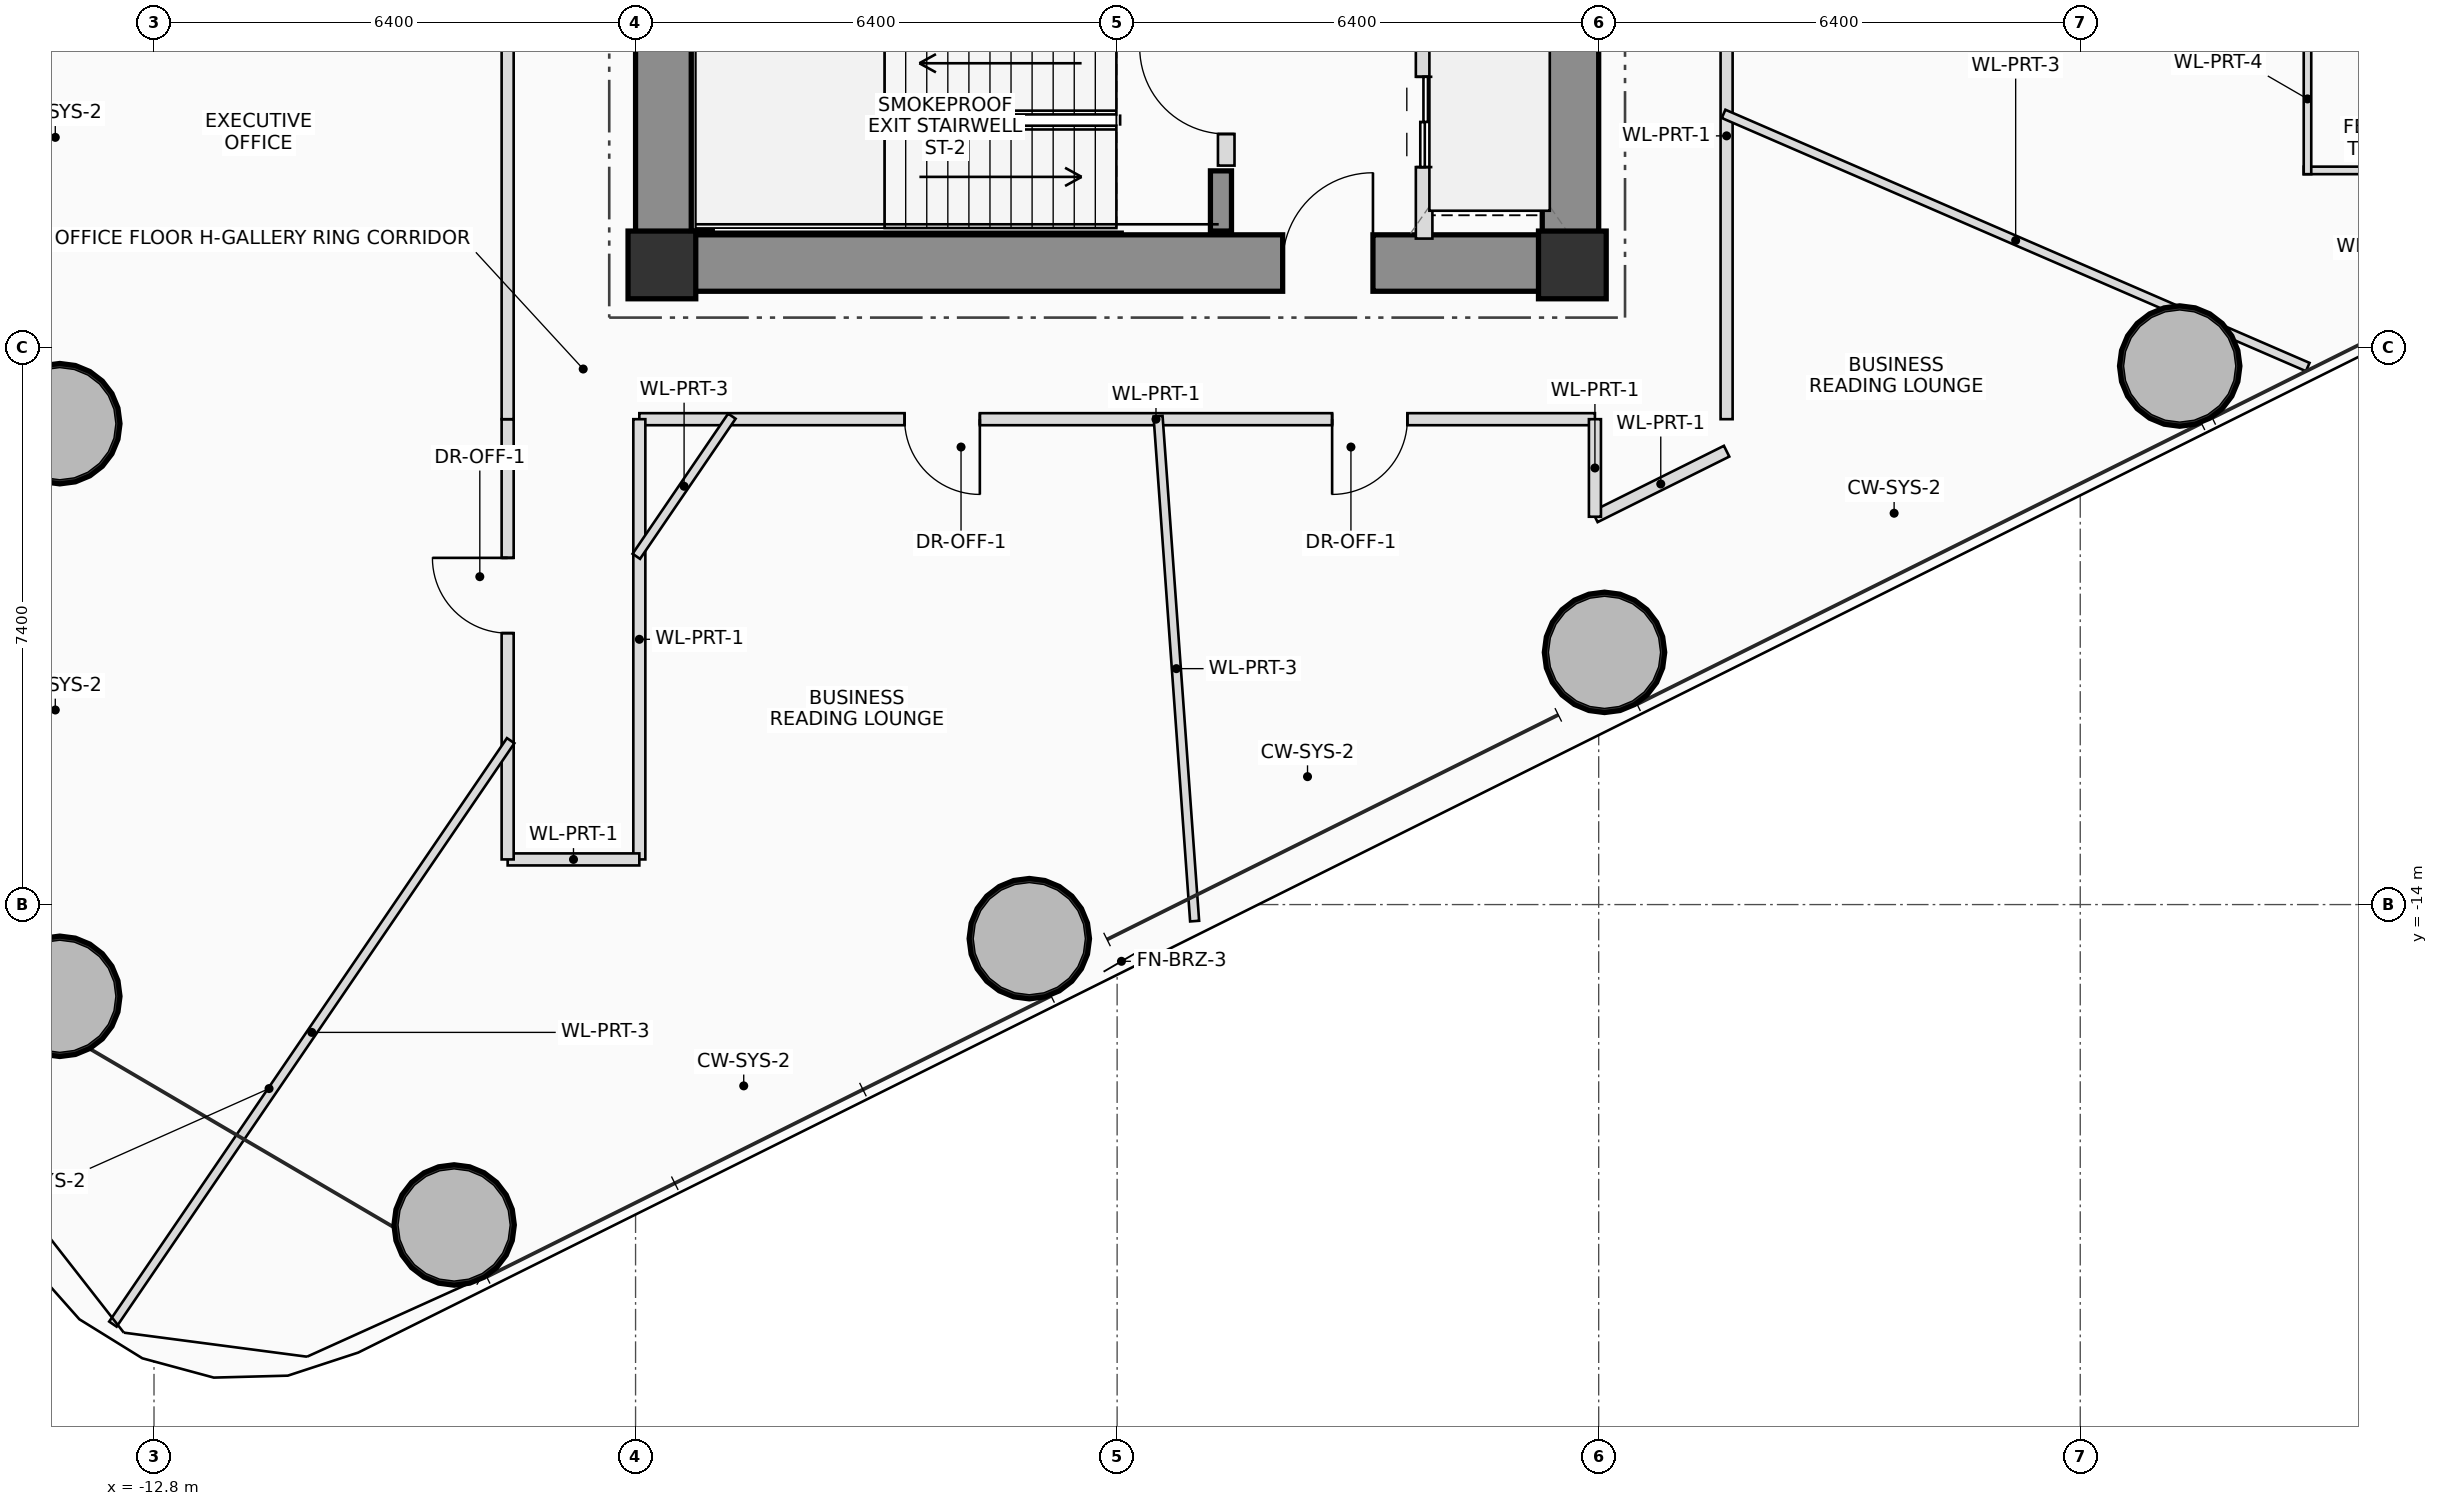
"""IFC4 building model, lengths in metres.
Left out: names, types, materials, properties, quantities, classifications, styles, units other than length and angle.
Written with IfcOpenShell. Run it as: python <this file> out.ifc"""

import sys

from ifc_helpers import new_model, si_unit, direction, frame, frame_2d, origin, origin_2d, place, context, subcontext, project, spatial, rectangle, hollow_circle, extrude, source, transform, mapped, element, fill, save


model = new_model("IFC4")
c1 = context("Model", 3, precision=1e-05, world=origin(), true_north=direction((0.0, 1.0)))
c2 = subcontext(c1, "Body", "Model", "MODEL_VIEW")
j1 = project(units=[si_unit("LENGTHUNIT", "METRE"), si_unit("PLANEANGLEUNIT", "RADIAN")], contexts=[c1])
p1 = place(None, origin())
s1 = spatial("IfcSite", under=j1, at=p1, CompositionType="ELEMENT")
p2 = place(p1, origin())
s2 = spatial("IfcBuilding", under=s1, at=p2, CompositionType="ELEMENT")
p3 = place(p2, frame((0.0, 0.0, 31.2)))
s3 = spatial("IfcBuildingStorey", under=s2, at=p3, CompositionType="ELEMENT", Elevation=31.2)
m1 = source(origin(), c2, "Body", "SweptSolid", [
    extrude(rectangle(XDim=0.9, YDim=0.9, at=origin_2d()), origin(), (0.0, 0.0, 1.0), 3.7),
])
for number, where, z_axis, x_axis in (
    (1, (-6.05, -5.5, 0.0), (0.0, 0.0, 1.0), (1.0, 0.0, 0.0)),
    (2, (6.05, -5.5, 0.0), (0.0, 0.0, 1.0), (1.0, 0.0, 0.0)),
):
    element("IfcColumn", number, at=place(p3, frame(where, z_axis=z_axis, x_axis=x_axis)), inside=s3, PredefinedType="COLUMN", context=c2, shape_type="MappedRepresentation", body=[
        mapped(m1, transform((0.0, 0.0, 0.0), scale=1.0)),
    ])
p4 = place(p3, frame((-6.4, -5.475, 0.0), z_axis=(0.0, 0.0, 1.0), x_axis=(1.0, 0.0, 0.0)))
e3 = element("IfcWall", 3, at=p4, inside=s3, PredefinedType="SHEAR", context=c2, shape_type="SweptSolid", body=[
    extrude(rectangle(XDim=12.8, YDim=0.75, at=frame_2d((6.4, 0.0))), origin(), (0.0, 0.0, 1.0), 3.7),
])
p5 = place(p4, frame((8.6, 0.0, 0.0)))
e4 = element("IfcOpeningElement", 4, at=p5, cuts=e3, PredefinedType="OPENING", context=c2, shape_type="SweptSolid", body=[
    extrude(rectangle(XDim=1.2, YDim=2.2, at=frame_2d((0.6, 1.1))), frame((0.0, 0.385, 0.0), z_axis=(0.0, -1.0, 0.0), x_axis=(1.0, 0.0, 0.0)), (0.0, 0.0, 1.0), 0.77),
])
p6 = place(p3, frame((6.025, -5.1, 0.0), z_axis=(0.0, 0.0, 1.0), x_axis=(0.0, 1.0, 0.0)))
e5 = element("IfcWall", 5, at=p6, inside=s3, PredefinedType="SHEAR", context=c2, shape_type="SweptSolid", body=[
    extrude(rectangle(XDim=10.2, YDim=0.75, at=frame_2d((5.1, 0.0))), origin(), (0.0, 0.0, 1.0), 3.7),
])
p7 = place(p3, frame((-6.025, -5.1, 0.0), z_axis=(0.0, 0.0, 1.0), x_axis=(0.0, 1.0, 0.0)))
e6 = element("IfcWall", 6, at=p7, inside=s3, PredefinedType="SHEAR", context=c2, shape_type="SweptSolid", body=[
    extrude(rectangle(XDim=3.35, YDim=0.75, at=frame_2d((1.675, 0.0))), origin(), (0.0, 0.0, 1.0), 3.7),
])
p8 = place(p3, frame((-5.52, -5.05, 0.0), z_axis=(0.0, 0.0, 1.0), x_axis=(0.0, 1.0, 0.0)))
e7 = element("IfcWall", 7, at=p8, inside=s3, PredefinedType="SHEAR", context=c2, shape_type="SweptSolid", body=[
    extrude(rectangle(XDim=2.75, YDim=0.28, at=frame_2d((1.375, 0.0))), origin(), (0.0, 0.0, 1.0), 3.7),
])
p9 = place(p3, frame((1.38, -5.05, 0.0), z_axis=(0.0, 0.0, 1.0), x_axis=(0.0, 1.0, 0.0)))
e8 = element("IfcWall", 8, at=p9, inside=s3, PredefinedType="SHEAR", context=c2, shape_type="SweptSolid", body=[
    extrude(rectangle(XDim=0.8, YDim=0.28, at=frame_2d((0.4, 0.0))), origin(), (0.0, 0.0, 1.0), 3.7),
])
m2 = source(origin(), c2, "Body", "SweptSolid", [
    extrude(hollow_circle(Radius=0.8, WallThickness=0.055, at=origin_2d()), origin(), (0.0, 0.0, 1.0), 3.7),
])
for number, where, z_axis, x_axis in (
    (9, (-8.812, -18.258, 0.0), (0.0, 0.0, 1.0), (1.0, 0.0, 0.0)),
    (10, (-1.167, -14.453, 0.0), (0.0, 0.0, 1.0), (1.0, 0.0, 0.0)),
    (11, (6.477, -10.648, 0.0), (0.0, 0.0, 1.0), (1.0, 0.0, 0.0)),
    (12, (14.122, -6.844, 0.0), (0.0, 0.0, 1.0), (1.0, 0.0, 0.0)),
    (13, (-14.052, -7.61, 0.0), (0.0, 0.0, 1.0), (1.0, 0.0, 0.0)),
    (14, (-14.052, -15.219, 0.0), (0.0, 0.0, 1.0), (1.0, 0.0, 0.0)),
):
    element("IfcColumn", number, at=place(p3, frame(where, z_axis=z_axis, x_axis=x_axis)), inside=s3, PredefinedType="COLUMN", context=c2, shape_type="MappedRepresentation", body=[
        mapped(m2, transform((0.0, 0.0, 0.0), scale=1.0)),
    ])
p10 = place(p3, frame((1.45, -4.18, 0.0), z_axis=(0.0, 0.0, 1.0), x_axis=(0.0, 1.0, 0.0)))
e15 = element("IfcWall", 15, at=p10, inside=s3, PredefinedType="PLUMBINGWALL", context=c2, shape_type="SweptSolid", body=[
    extrude(rectangle(XDim=1.98, YDim=0.22, at=frame_2d((0.99, 0.0))), origin(), (0.0, 0.0, 1.0), 3.495),
])
p11 = place(p10, frame((0.42, 0.0, 0.0)))
e16 = element("IfcOpeningElement", 16, at=p11, cuts=e15, PredefinedType="OPENING", context=c2, shape_type="SweptSolid", body=[
    extrude(rectangle(XDim=1.15, YDim=2.15, at=frame_2d((0.575, 1.075))), frame((0.0, 0.12, 0.0), z_axis=(0.0, -1.0, 0.0), x_axis=(1.0, 0.0, 0.0)), (0.0, 0.0, 1.0), 0.24),
])
p12 = place(p3, frame((4.08, -5.15, 0.0), z_axis=(0.0, 0.0, 1.0), x_axis=(0.0, 1.0, 0.0)))
e17 = element("IfcWall", 17, at=p12, inside=s3, PredefinedType="PLUMBINGWALL", context=c2, shape_type="SweptSolid", body=[
    extrude(rectangle(XDim=2.95, YDim=0.22, at=frame_2d((1.475, 0.0))), origin(), (0.0, 0.0, 1.0), 3.495),
])
p13 = place(p12, frame((0.95, 0.0, 0.0)))
e18 = element("IfcOpeningElement", 18, at=p13, cuts=e17, PredefinedType="OPENING", context=c2, shape_type="SweptSolid", body=[
    extrude(rectangle(XDim=1.2, YDim=2.25, at=frame_2d((0.6, 1.125))), frame((0.0, 0.12, 0.0), z_axis=(0.0, -1.0, 0.0), x_axis=(1.0, 0.0, 0.0)), (0.0, 0.0, 1.0), 0.24),
])
p14 = place(p3, frame((17.82, -4.244, 0.0), z_axis=(0.0, 0.0, 1.0), x_axis=(-1.0, 0.0, 0.0)))
e19 = element("IfcWall", 19, at=p14, inside=s3, PredefinedType="PARTITIONING", context=c2, shape_type="SweptSolid", body=[
    extrude(rectangle(XDim=2.05, YDim=0.1, at=frame_2d((1.025, 0.0))), origin(), (0.0, 0.0, 1.0), 3.495),
])
p15 = place(p3, frame((15.82, -4.294, 0.0), z_axis=(0.0, 0.0, 1.0), x_axis=(0.0, 1.0, 0.0)))
e20 = element("IfcWall", 20, at=p15, inside=s3, PredefinedType="PARTITIONING", context=c2, shape_type="SweptSolid", body=[
    extrude(rectangle(XDim=2.0, YDim=0.1, at=frame_2d((1.0, 0.0))), origin(), (0.0, 0.0, 1.0), 2.8),
])
p16 = place(p3, frame((6.35, -7.55, 0.0), z_axis=(0.0, 0.0, 1.0), x_axis=(-1.0, 0.0, 0.0)))
e21 = element("IfcWall", 21, at=p16, inside=s3, PredefinedType="PARTITIONING", context=c2, shape_type="SweptSolid", body=[
    extrude(rectangle(XDim=12.7, YDim=0.16, at=frame_2d((6.35, 0.0))), origin(), (0.0, 0.0, 1.0), 2.8),
])
p17 = place(p16, frame((2.493, 0.0, 0.0)))
e22 = element("IfcOpeningElement", 22, at=p17, cuts=e21, PredefinedType="OPENING", context=c2, shape_type="SweptSolid", body=[
    extrude(rectangle(XDim=1.0, YDim=2.25, at=frame_2d((0.5, 1.125))), frame((0.0, 0.09, 0.0), z_axis=(0.0, -1.0, 0.0), x_axis=(1.0, 0.0, 0.0)), (0.0, 0.0, 1.0), 0.18),
])
p18 = place(p16, frame((8.175, 0.0, 0.0)))
e23 = element("IfcOpeningElement", 23, at=p18, cuts=e21, PredefinedType="OPENING", context=c2, shape_type="SweptSolid", body=[
    extrude(rectangle(XDim=1.0, YDim=2.25, at=frame_2d((0.5, 1.125))), frame((0.0, 0.09, 0.0), z_axis=(0.0, -1.0, 0.0), x_axis=(1.0, 0.0, 0.0)), (0.0, 0.0, 1.0), 0.18),
])
p19 = place(p3, frame((-6.35, -7.55, 0.0), z_axis=(0.0, 0.0, 1.0), x_axis=(0.0, -1.0, 0.0)))
e24 = element("IfcWall", 24, at=p19, inside=s3, PredefinedType="PARTITIONING", context=c2, shape_type="SweptSolid", body=[
    extrude(rectangle(XDim=5.85, YDim=0.16, at=frame_2d((2.925, 0.0))), origin(), (0.0, 0.0, 1.0), 2.8),
])
p20 = place(p3, frame((-6.35, -13.4, 0.0), z_axis=(0.0, 0.0, 1.0), x_axis=(-1.0, 0.0, 0.0)))
e25 = element("IfcWall", 25, at=p20, inside=s3, PredefinedType="PARTITIONING", context=c2, shape_type="SweptSolid", body=[
    extrude(rectangle(XDim=1.75, YDim=0.16, at=frame_2d((0.875, 0.0))), origin(), (0.0, 0.0, 1.0), 2.8),
])
p21 = place(p3, frame((-8.1, -13.4, 0.0), z_axis=(0.0, 0.0, 1.0), x_axis=(0.0, 1.0, 0.0)))
e26 = element("IfcWall", 26, at=p21, inside=s3, PredefinedType="PARTITIONING", context=c2, shape_type="SweptSolid", body=[
    extrude(rectangle(XDim=5.85, YDim=0.16, at=frame_2d((2.925, 0.0))), origin(), (0.0, 0.0, 1.0), 2.8),
])
p22 = place(p21, frame((3.007, 0.0, 0.0)))
e27 = element("IfcOpeningElement", 27, at=p22, cuts=e26, PredefinedType="OPENING", context=c2, shape_type="SweptSolid", body=[
    extrude(rectangle(XDim=1.0, YDim=2.25, at=frame_2d((0.5, 1.125))), frame((0.0, 0.09, 0.0), z_axis=(0.0, -1.0, 0.0), x_axis=(1.0, 0.0, 0.0)), (0.0, 0.0, 1.0), 0.18),
])
p23 = place(p3, frame((-8.1, -7.55, 0.0), z_axis=(0.0, 0.0, 1.0), x_axis=(0.0, 1.0, 0.0)))
e28 = element("IfcWall", 28, at=p23, inside=s3, PredefinedType="PARTITIONING", context=c2, shape_type="SweptSolid", body=[
    extrude(rectangle(XDim=15.1, YDim=0.16, at=frame_2d((7.55, 0.0))), origin(), (0.0, 0.0, 1.0), 2.8),
])
p24 = place(p23, frame((11.285, 0.0, 0.0)))
e29 = element("IfcOpeningElement", 29, at=p24, cuts=e28, PredefinedType="OPENING", context=c2, shape_type="SweptSolid", body=[
    extrude(rectangle(XDim=1.0, YDim=2.25, at=frame_2d((0.5, 1.125))), frame((0.0, 0.09, 0.0), z_axis=(0.0, -1.0, 0.0), x_axis=(1.0, 0.0, 0.0)), (0.0, 0.0, 1.0), 0.18),
])
p25 = place(p3, frame((8.1, -0.02, 0.0), z_axis=(0.0, 0.0, 1.0), x_axis=(0.0, -1.0, 0.0)))
e30 = element("IfcWall", 30, at=p25, inside=s3, PredefinedType="PARTITIONING", context=c2, shape_type="SweptSolid", body=[
    extrude(rectangle(XDim=7.53, YDim=0.16, at=frame_2d((3.765, 0.0))), origin(), (0.0, 0.0, 1.0), 2.8),
])
p26 = place(p3, frame((8.1, -7.975, 0.0), z_axis=(0.0, 0.0, 1.0), x_axis=(-0.89527489017, -0.445514164793, 0.0)))
e31 = element("IfcWall", 31, at=p26, inside=s3, PredefinedType="PARTITIONING", context=c2, shape_type="SweptSolid", body=[
    extrude(rectangle(XDim=1.955, YDim=0.16, at=frame_2d((0.977, 0.0))), origin(), (0.0, 0.0, 1.0), 2.8),
])
p27 = place(p3, frame((6.35, -8.846, 0.0), z_axis=(0.0, 0.0, 1.0), x_axis=(0.0, 1.0, 0.0)))
e32 = element("IfcWall", 32, at=p27, inside=s3, PredefinedType="PARTITIONING", context=c2, shape_type="SweptSolid", body=[
    extrude(rectangle(XDim=1.296, YDim=0.16, at=frame_2d((0.648, 0.0))), origin(), (0.0, 0.0, 1.0), 2.8),
])
p28 = place(p3, frame((-5.12, -7.51, 0.0), z_axis=(0.0, 0.0, 1.0), x_axis=(-0.563343546536, -0.826222759657, 0.0)))
e33 = element("IfcWall", 33, at=p28, inside=s3, PredefinedType="PARTITIONING", context=c2, shape_type="SweptSolid", body=[
    extrude(rectangle(XDim=2.254, YDim=0.12, at=frame_2d((1.127, 0.0))), origin(), (0.0, 0.0, 1.0), 3.16),
])
p29 = place(p3, frame((-8.06, -11.822, 0.0), z_axis=(0.0, 0.0, 1.0), x_axis=(-0.56331583488, -0.826241653618, 0.0)))
e34 = element("IfcWall", 34, at=p29, inside=s3, PredefinedType="PARTITIONING", context=c2, shape_type="SweptSolid", body=[
    extrude(rectangle(XDim=9.384, YDim=0.12, at=frame_2d((4.692, 0.0))), origin(), (0.0, 0.0, 1.0), 2.96),
])
p30 = place(p3, frame((0.544, -7.51, 0.0), z_axis=(0.0, 0.0, 1.0), x_axis=(0.072255425025, -0.997386160699, 0.0)))
e35 = element("IfcWall", 35, at=p30, inside=s3, PredefinedType="PARTITIONING", context=c2, shape_type="SweptSolid", body=[
    extrude(rectangle(XDim=6.727, YDim=0.12, at=frame_2d((3.364, 0.0))), origin(), (0.0, 0.0, 1.0), 2.96),
])
p31 = place(p3, frame((8.06, -3.493, 0.0), z_axis=(0.0, 0.0, 1.0), x_axis=(0.917561590562, -0.397593671385, 0.0)))
e36 = element("IfcWall", 36, at=p31, inside=s3, PredefinedType="PARTITIONING", context=c2, shape_type="SweptSolid", body=[
    extrude(rectangle(XDim=8.461, YDim=0.12, at=frame_2d((4.23, 0.0))), origin(), (0.0, 0.0, 1.0), 2.8),
])
p32 = place(p5, origin())
e37 = element("IfcDoor", 37, at=p32, inside=s3, OperationType="SINGLE_SWING_RIGHT", PredefinedType="DOOR", context=c2, shape_type="SweptSolid", body=[
    extrude(rectangle(XDim=1.2, YDim=2.2, at=frame_2d((0.6, 1.1))), frame((0.0, 0.025, 0.0), z_axis=(0.0, -1.0, 0.0), x_axis=(1.0, 0.0, 0.0)), (0.0, 0.0, 1.0), 0.05),
])
fill(e4, e37)
p33 = place(p11, origin())
e38 = element("IfcDoor", 38, at=p33, inside=s3, OperationType="SINGLE_SWING_RIGHT", PredefinedType="DOOR", context=c2, shape_type="SweptSolid", body=[
    extrude(rectangle(XDim=1.15, YDim=2.15, at=frame_2d((0.575, 1.075))), frame((0.0, 0.025, 0.0), z_axis=(0.0, -1.0, 0.0), x_axis=(1.0, 0.0, 0.0)), (0.0, 0.0, 1.0), 0.05),
])
fill(e16, e38)
p34 = place(p13, origin())
e39 = element("IfcDoor", 39, at=p34, inside=s3, OperationType="DOUBLE_DOOR_SLIDING", PredefinedType="DOOR", context=c2, shape_type="SweptSolid", body=[
    extrude(rectangle(XDim=1.2, YDim=2.25, at=frame_2d((0.6, 1.125))), frame((0.0, 0.025, 0.0), z_axis=(0.0, -1.0, 0.0), x_axis=(1.0, 0.0, 0.0)), (0.0, 0.0, 1.0), 0.05),
])
fill(e18, e39)
p35 = place(p17, origin())
e40 = element("IfcDoor", 40, at=p35, inside=s3, OperationType="SINGLE_SWING_RIGHT", PredefinedType="DOOR", context=c2, shape_type="SweptSolid", body=[
    extrude(rectangle(XDim=1.0, YDim=2.25, at=frame_2d((0.5, 1.125))), frame((0.0, 0.025, 0.0), z_axis=(0.0, -1.0, 0.0), x_axis=(1.0, 0.0, 0.0)), (0.0, 0.0, 1.0), 0.05),
])
fill(e22, e40)
p36 = place(p18, origin())
e41 = element("IfcDoor", 41, at=p36, inside=s3, OperationType="SINGLE_SWING_LEFT", PredefinedType="DOOR", context=c2, shape_type="SweptSolid", body=[
    extrude(rectangle(XDim=1.0, YDim=2.25, at=frame_2d((0.5, 1.125))), frame((0.0, 0.025, 0.0), z_axis=(0.0, -1.0, 0.0), x_axis=(1.0, 0.0, 0.0)), (0.0, 0.0, 1.0), 0.05),
])
fill(e23, e41)
p37 = place(p22, origin())
e42 = element("IfcDoor", 42, at=p37, inside=s3, OperationType="SINGLE_SWING_RIGHT", PredefinedType="DOOR", context=c2, shape_type="SweptSolid", body=[
    extrude(rectangle(XDim=1.0, YDim=2.25, at=frame_2d((0.5, 1.125))), frame((0.0, 0.025, 0.0), z_axis=(0.0, -1.0, 0.0), x_axis=(1.0, 0.0, 0.0)), (0.0, 0.0, 1.0), 0.05),
])
fill(e27, e42)
save(model, sys.argv[1])
